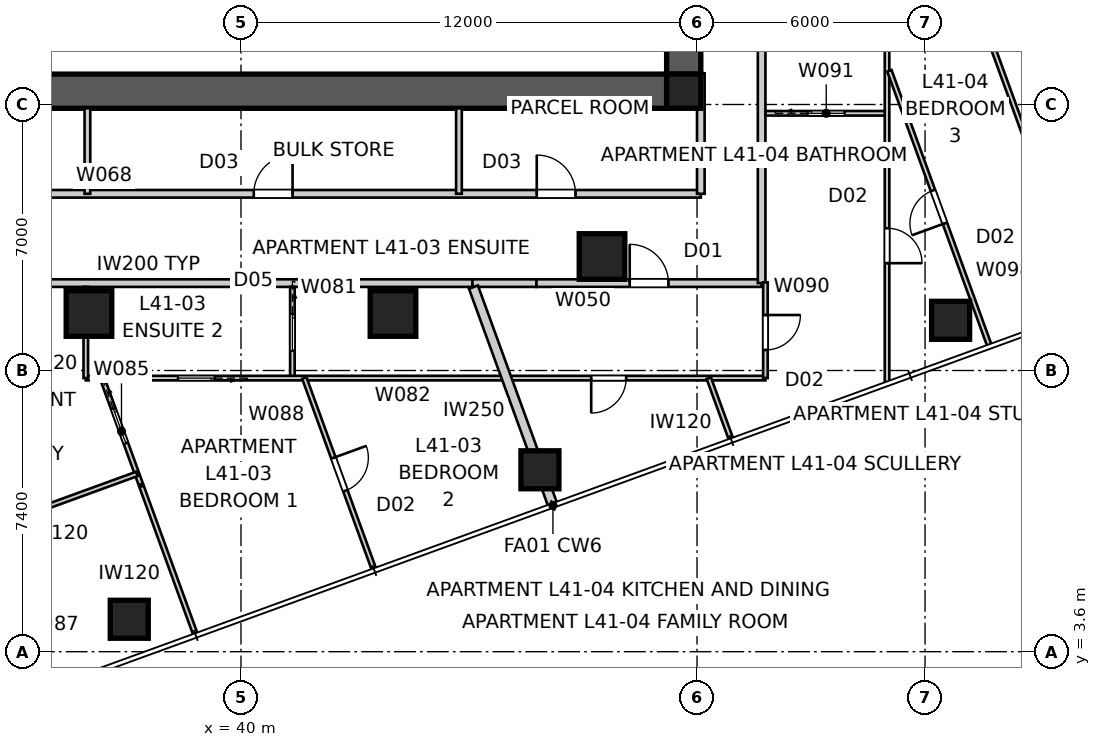
"""IFC4 building model, lengths in metres.
Left out: names, types, materials, properties, quantities, classifications, styles, units other than length and angle.
Written with IfcOpenShell. Run it as: python <this file> out.ifc"""

import sys

from ifc_helpers import new_model, si_unit, direction, frame, frame_2d, origin, origin_2d, place, context, subcontext, project, spatial, polyline, rectangle, outline, extrude, element, fill, save


model = new_model("IFC4")
c1 = context("Model", 3, precision=1e-05, world=origin(), true_north=direction((0.0, 1.0)))
c2 = subcontext(c1, "Body", "Model", "MODEL_VIEW")
j1 = project(units=[si_unit("LENGTHUNIT", "METRE"), si_unit("PLANEANGLEUNIT", "RADIAN")], contexts=[c1])
p1 = place(None, origin())
s1 = spatial("IfcSite", under=j1, at=p1, CompositionType="ELEMENT")
p2 = place(p1, origin())
s2 = spatial("IfcBuilding", under=s1, at=p2, CompositionType="ELEMENT")
p3 = place(p2, frame((0.0, 0.0, 150.6)))
s3 = spatial("IfcBuildingStorey", under=s2, at=p3, CompositionType="ELEMENT", Elevation=150.6)
p4 = place(p3, frame((51.2, 18.35, 0.0), z_axis=(0.0, 0.0, 1.0), x_axis=(-1.0, 0.0, 0.0)))
e1 = element("IfcWall", 1, at=p4, inside=s3, PredefinedType="SHEAR", context=c2, shape_type="SweptSolid", body=[
    extrude(outline(polyline([(0.0, -0.45), (22.4, -0.45), (22.4, -0.025), (22.85, -0.025), (22.85, 0.025), (22.4, 0.025), (22.4, 0.45), (0.0, 0.45), (0.0, 0.025), (-0.45, 0.025), (-0.45, -0.025), (0.0, -0.025), (0.0, -0.45)])), origin(), (0.0, 0.0, 1.0), 3.4),
])
p5 = place(p3, frame((51.65, 18.8, 0.0), z_axis=(0.0, 0.0, 1.0), x_axis=(0.0, 1.0, 0.0)))
e2 = element("IfcWall", 2, at=p5, inside=s3, PredefinedType="SHEAR", context=c2, shape_type="SweptSolid", body=[
    extrude(outline(polyline([(0.0, -0.45), (22.4, -0.45), (22.4, -0.025), (22.85, -0.025), (22.85, 0.025), (22.4, 0.025), (22.4, 0.45), (0.0, 0.45), (0.0, 0.025), (-0.45, 0.025), (-0.45, -0.025), (0.0, -0.025), (0.0, -0.45)])), origin(), (0.0, 0.0, 1.0), 3.4),
])
p6 = place(p5, frame((11.14, 0.0, 0.0)))
e3 = element("IfcOpeningElement", 3, at=p6, cuts=e2, PredefinedType="OPENING", context=c2, shape_type="SweptSolid", body=[
    extrude(rectangle(XDim=1.02, YDim=2.4, at=frame_2d((0.51, 1.2))), frame((0.0, 0.46, 0.0), z_axis=(0.0, -1.0, 0.0), x_axis=(1.0, 0.0, 0.0)), (0.0, 0.0, 1.0), 0.92),
])
p7 = place(p3, frame((51.65, 18.35, 0.0), z_axis=(0.0, 0.0, 1.0), x_axis=(1.0, 0.0, 0.0)))
e4 = element("IfcColumn", 4, at=p7, inside=s3, PredefinedType="COLUMN", context=c2, shape_type="SweptSolid", body=[
    extrude(rectangle(XDim=0.9, YDim=0.9, at=origin_2d()), origin(), (0.0, 0.0, 1.0), 3.4),
])
for number, where, z_axis, x_axis in (
    (5, (37.06, 4.454, 0.0), (0.0, 0.0, 1.0), (1.0, 0.0, 0.0)),
    (6, (47.866, 8.387, 0.0), (0.0, 0.0, 1.0), (1.0, 0.0, 0.0)),
    (7, (58.673, 12.32, 0.0), (0.0, 0.0, 1.0), (1.0, 0.0, 0.0)),
):
    element("IfcColumn", number, at=place(p3, frame(where, z_axis=z_axis, x_axis=x_axis)), inside=s3, PredefinedType="COLUMN", context=c2, shape_type="SweptSolid", body=[
        extrude(rectangle(XDim=1.0, YDim=1.0, at=origin_2d()), origin(), (0.0, 0.0, 1.0), 3.4),
    ])
for number, where, z_axis, x_axis in (
    (8, (36.0, 12.5, 0.0), (0.0, 0.0, 1.0), (1.0, 0.0, 0.0)),
    (9, (44.0, 12.5, 0.0), (0.0, 0.0, 1.0), (1.0, 0.0, 0.0)),
    (10, (49.5, 14.0, 0.0), (0.0, 0.0, 1.0), (1.0, 0.0, 0.0)),
):
    element("IfcColumn", number, at=place(p3, frame(where, z_axis=z_axis, x_axis=x_axis)), inside=s3, PredefinedType="COLUMN", context=c2, shape_type="SweptSolid", body=[
        extrude(rectangle(XDim=1.2, YDim=1.2, at=origin_2d()), origin(), (0.0, 0.0, 1.0), 3.4),
    ])
p8 = place(p3, frame((33.908, 13.3, 0.0), z_axis=(0.0, 0.0, 1.0), x_axis=(1.0, 0.0, 0.0)))
e11 = element("IfcWall", 11, at=p8, inside=s3, PredefinedType="PARTITIONING", context=c2, shape_type="SweptSolid", body=[
    extrude(rectangle(XDim=12.183, YDim=0.2, at=frame_2d((6.092, 0.0))), origin(), (0.0, 0.0, 1.0), 3.25),
])
p9 = place(p3, frame((46.092, 13.3, 0.0), z_axis=(0.0, 0.0, 1.0), x_axis=(1.0, 0.0, 0.0)))
e12 = element("IfcWall", 12, at=p9, inside=s3, PredefinedType="PARTITIONING", context=c2, shape_type="SweptSolid", body=[
    extrude(rectangle(XDim=1.684, YDim=0.2, at=frame_2d((0.842, 0.0))), origin(), (0.0, 0.0, 1.0), 2.55),
])
p10 = place(p3, frame((47.775, 13.3, 0.0), z_axis=(0.0, 0.0, 1.0), x_axis=(1.0, 0.0, 0.0)))
e13 = element("IfcWall", 13, at=p10, inside=s3, PredefinedType="PARTITIONING", context=c2, shape_type="SweptSolid", body=[
    extrude(rectangle(XDim=5.925, YDim=0.2, at=frame_2d((2.962, 0.0))), origin(), (0.0, 0.0, 1.0), 3.25),
])
p11 = place(p10, frame((2.453, 0.0, 0.0)))
e14 = element("IfcOpeningElement", 14, at=p11, cuts=e13, PredefinedType="OPENING", context=c2, shape_type="SweptSolid", body=[
    extrude(rectangle(XDim=1.02, YDim=2.34, at=frame_2d((0.51, 1.17))), frame((0.0, 0.11, 0.0), z_axis=(0.0, -1.0, 0.0), x_axis=(1.0, 0.0, 0.0)), (0.0, 0.0, 1.0), 0.22),
])
p12 = place(p3, frame((53.7, 13.3, 0.0), z_axis=(0.0, 0.0, 1.0), x_axis=(0.0, 1.0, 0.0)))
e15 = element("IfcWall", 15, at=p12, inside=s3, PredefinedType="PARTITIONING", context=c2, shape_type="SweptSolid", body=[
    extrude(rectangle(XDim=33.0, YDim=0.2, at=frame_2d((16.5, 0.0))), origin(), (0.0, 0.0, 1.0), 3.25),
])
p13 = place(p12, frame((28.411, 0.0, 0.0)))
e16 = element("IfcOpeningElement", 16, at=p13, cuts=e15, PredefinedType="OPENING", context=c2, shape_type="SweptSolid", body=[
    extrude(rectangle(XDim=1.02, YDim=2.1, at=frame_2d((0.51, 1.05))), frame((0.0, 0.11, 0.0), z_axis=(0.0, -1.0, 0.0), x_axis=(1.0, 0.0, 0.0)), (0.0, 0.0, 1.0), 0.22),
])
p14 = place(p12, frame((13.741, 0.0, 0.0)))
e17 = element("IfcOpeningElement", 17, at=p14, cuts=e15, PredefinedType="OPENING", context=c2, shape_type="SweptSolid", body=[
    extrude(rectangle(XDim=1.02, YDim=2.34, at=frame_2d((0.51, 1.17))), frame((0.0, 0.11, 0.0), z_axis=(0.0, -1.0, 0.0), x_axis=(1.0, 0.0, 0.0)), (0.0, 0.0, 1.0), 0.22),
])
p15 = place(p3, frame((48.208, 7.447, 0.0), z_axis=(0.0, 0.0, 1.0), x_axis=(-0.341999444481, 0.939700154291, 0.0)))
e18 = element("IfcWall", 18, at=p15, inside=s3, PredefinedType="PARTITIONING", context=c2, shape_type="SweptSolid", body=[
    extrude(rectangle(XDim=6.116, YDim=0.25, at=frame_2d((3.058, 0.0))), origin(), (0.0, 0.0, 1.0), 3.25),
])
p16 = place(p3, frame((27.9, 15.65, 0.0), z_axis=(0.0, 0.0, 1.0), x_axis=(1.0, 0.0, 0.0)))
e19 = element("IfcWall", 19, at=p16, inside=s3, PredefinedType="PARTITIONING", context=c2, shape_type="SweptSolid", body=[
    extrude(rectangle(XDim=24.2, YDim=0.2, at=frame_2d((12.1, 0.0))), origin(), (0.0, 0.0, 1.0), 3.25),
])
p17 = place(p16, frame((12.437, 0.0, 0.0)))
e20 = element("IfcOpeningElement", 20, at=p17, cuts=e19, PredefinedType="OPENING", context=c2, shape_type="SweptSolid", body=[
    extrude(rectangle(XDim=1.02, YDim=2.1, at=frame_2d((0.51, 1.05))), frame((0.0, 0.11, 0.0), z_axis=(0.0, -1.0, 0.0), x_axis=(1.0, 0.0, 0.0)), (0.0, 0.0, 1.0), 0.22),
])
p18 = place(p16, frame((3.544, 0.0, 0.0)))
e21 = element("IfcOpeningElement", 21, at=p18, cuts=e19, PredefinedType="OPENING", context=c2, shape_type="SweptSolid", body=[
    extrude(rectangle(XDim=1.02, YDim=2.1, at=frame_2d((0.51, 1.05))), frame((0.0, 0.11, 0.0), z_axis=(0.0, -1.0, 0.0), x_axis=(1.0, 0.0, 0.0)), (0.0, 0.0, 1.0), 0.22),
])
p19 = place(p16, frame((19.883, 0.0, 0.0)))
e22 = element("IfcOpeningElement", 22, at=p19, cuts=e19, PredefinedType="OPENING", context=c2, shape_type="SweptSolid", body=[
    extrude(rectangle(XDim=1.02, YDim=2.1, at=frame_2d((0.51, 1.05))), frame((0.0, 0.11, 0.0), z_axis=(0.0, -1.0, 0.0), x_axis=(1.0, 0.0, 0.0)), (0.0, 0.0, 1.0), 0.22),
])
p20 = place(p3, frame((52.1, 15.65, 0.0), z_axis=(0.0, 0.0, 1.0), x_axis=(0.0, 1.0, 0.0)))
e23 = element("IfcWall", 23, at=p20, inside=s3, PredefinedType="PARTITIONING", context=c2, shape_type="SweptSolid", body=[
    extrude(rectangle(XDim=3.17, YDim=0.2, at=frame_2d((1.585, 0.0))), origin(), (0.0, 0.0, 1.0), 3.25),
])
p21 = place(p3, frame((35.958, 15.65, 0.0), z_axis=(0.0, 0.0, 1.0), x_axis=(0.0, 1.0, 0.0)))
e24 = element("IfcWall", 24, at=p21, inside=s3, PredefinedType="SOLIDWALL", context=c2, shape_type="SweptSolid", body=[
    extrude(rectangle(XDim=2.25, YDim=0.15, at=frame_2d((1.125, 0.0))), origin(), (0.0, 0.0, 1.0), 3.25),
])
p22 = place(p3, frame((45.735, 15.65, 0.0), z_axis=(0.0, 0.0, 1.0), x_axis=(0.0, 1.0, 0.0)))
e25 = element("IfcWall", 25, at=p22, inside=s3, PredefinedType="SOLIDWALL", context=c2, shape_type="SweptSolid", body=[
    extrude(rectangle(XDim=2.25, YDim=0.15, at=frame_2d((1.125, 0.0))), origin(), (0.0, 0.0, 1.0), 2.796),
])
p23 = place(p3, frame((41.353, 13.2, 0.0), z_axis=(0.0, 0.0, 1.0), x_axis=(0.0, -1.0, 0.0)))
e26 = element("IfcWall", 26, at=p23, inside=s3, PredefinedType="PARTITIONING", context=c2, shape_type="SweptSolid", body=[
    extrude(rectangle(XDim=2.4, YDim=0.12, at=frame_2d((1.2, 0.0))), origin(), (0.0, 0.0, 1.0), 3.25),
])
p24 = place(p23, frame((0.72, 0.0, 0.0)))
e27 = element("IfcOpeningElement", 27, at=p24, cuts=e26, PredefinedType="OPENING", context=c2, shape_type="SweptSolid", body=[
    extrude(rectangle(XDim=0.96, YDim=2.1, at=frame_2d((0.48, 1.05))), frame((0.0, 0.07, 0.0), z_axis=(0.0, -1.0, 0.0), x_axis=(1.0, 0.0, 0.0)), (0.0, 0.0, 1.0), 0.14),
])
p25 = place(p3, frame((53.8, 10.8, 0.0), z_axis=(0.0, 0.0, 1.0), x_axis=(-1.0, 0.0, 0.0)))
e28 = element("IfcWall", 28, at=p25, inside=s3, PredefinedType="PARTITIONING", context=c2, shape_type="SweptSolid", body=[
    extrude(rectangle(XDim=17.884, YDim=0.12, at=frame_2d((8.942, 0.0))), origin(), (0.0, 0.0, 1.0), 3.25),
])
p26 = place(p25, frame((3.665, 0.0, 0.0)))
e29 = element("IfcOpeningElement", 29, at=p26, cuts=e28, PredefinedType="OPENING", context=c2, shape_type="SweptSolid", body=[
    extrude(rectangle(XDim=0.92, YDim=2.34, at=frame_2d((0.46, 1.17))), frame((0.0, 0.07, 0.0), z_axis=(0.0, -1.0, 0.0), x_axis=(1.0, 0.0, 0.0)), (0.0, 0.0, 1.0), 0.14),
])
p27 = place(p25, frame((14.497, 0.0, 0.0)))
e30 = element("IfcOpeningElement", 30, at=p27, cuts=e28, PredefinedType="OPENING", context=c2, shape_type="SweptSolid", body=[
    extrude(rectangle(XDim=0.96, YDim=2.1, at=frame_2d((0.48, 1.05))), frame((0.0, 0.07, 0.0), z_axis=(0.0, -1.0, 0.0), x_axis=(1.0, 0.0, 0.0)), (0.0, 0.0, 1.0), 0.14),
])
p28 = place(p3, frame((35.916, 10.8, 0.0), z_axis=(0.0, 0.0, 1.0), x_axis=(0.0, 1.0, 0.0)))
e31 = element("IfcWall", 31, at=p28, inside=s3, PredefinedType="PARTITIONING", context=c2, shape_type="SweptSolid", body=[
    extrude(rectangle(XDim=2.4, YDim=0.12, at=frame_2d((1.2, 0.0))), origin(), (0.0, 0.0, 1.0), 3.25),
])
p29 = place(p3, frame((36.346, 10.8, 0.0), z_axis=(0.0, 0.0, 1.0), x_axis=(0.341986632257, -0.939704817141, 0.0)))
e32 = element("IfcWall", 32, at=p29, inside=s3, PredefinedType="PARTITIONING", context=c2, shape_type="SweptSolid", body=[
    extrude(rectangle(XDim=2.978, YDim=0.12, at=frame_2d((1.489, 0.0))), origin(), (0.0, 0.0, 1.0), 3.25),
])
p30 = place(p29, frame((0.861, 0.0, 0.0)))
e33 = element("IfcOpeningElement", 33, at=p30, cuts=e32, PredefinedType="OPENING", context=c2, shape_type="SweptSolid", body=[
    extrude(rectangle(XDim=0.96, YDim=2.1, at=frame_2d((0.48, 1.05))), frame((0.0, 0.07, 0.0), z_axis=(0.0, -1.0, 0.0), x_axis=(1.0, 0.0, 0.0)), (0.0, 0.0, 1.0), 0.14),
])
p31 = place(p3, frame((37.264, 8.28, 0.0), z_axis=(0.0, 0.0, 1.0), x_axis=(-0.939686455819, -0.342037080957, 0.0)))
e34 = element("IfcWall", 34, at=p31, inside=s3, PredefinedType="PARTITIONING", context=c2, shape_type="SweptSolid", body=[
    extrude(rectangle(XDim=5.0, YDim=0.12, at=frame_2d((2.5, 0.0))), origin(), (0.0, 0.0, 1.0), 3.25),
])
p32 = place(p3, frame((41.667, 10.8, 0.0), z_axis=(0.0, 0.0, 1.0), x_axis=(0.341995981916, -0.939701414468, 0.0)))
e35 = element("IfcWall", 35, at=p32, inside=s3, PredefinedType="PARTITIONING", context=c2, shape_type="SweptSolid", body=[
    extrude(rectangle(XDim=5.348, YDim=0.12, at=frame_2d((2.674, 0.0))), origin(), (0.0, 0.0, 1.0), 3.25),
])
p33 = place(p32, frame((2.234, 0.0, 0.0)))
e36 = element("IfcOpeningElement", 36, at=p33, cuts=e35, PredefinedType="OPENING", context=c2, shape_type="SweptSolid", body=[
    extrude(rectangle(XDim=0.92, YDim=2.34, at=frame_2d((0.46, 1.17))), frame((0.0, 0.07, 0.0), z_axis=(0.0, -1.0, 0.0), x_axis=(1.0, 0.0, 0.0)), (0.0, 0.0, 1.0), 0.14),
])
p34 = place(p3, frame((38.798, 4.065, 0.0), z_axis=(0.0, 0.0, 1.0), x_axis=(-0.342036918442, 0.939686514973, 0.0)))
e37 = element("IfcWall", 37, at=p34, inside=s3, PredefinedType="PARTITIONING", context=c2, shape_type="SweptSolid", body=[
    extrude(rectangle(XDim=4.136, YDim=0.12, at=frame_2d((2.068, 0.0))), origin(), (0.0, 0.0, 1.0), 3.25),
])
p35 = place(p3, frame((53.8, 13.32, 0.0), z_axis=(0.0, 0.0, 1.0), x_axis=(0.0, -1.0, 0.0)))
e38 = element("IfcWall", 38, at=p35, inside=s3, PredefinedType="PARTITIONING", context=c2, shape_type="SweptSolid", body=[
    extrude(rectangle(XDim=2.52, YDim=0.12, at=frame_2d((1.26, 0.0))), origin(), (0.0, 0.0, 1.0), 3.25),
])
p36 = place(p35, frame((0.86, 0.0, 0.0)))
e39 = element("IfcOpeningElement", 39, at=p36, cuts=e38, PredefinedType="OPENING", context=c2, shape_type="SweptSolid", body=[
    extrude(rectangle(XDim=0.92, YDim=2.34, at=frame_2d((0.46, 1.17))), frame((0.0, 0.07, 0.0), z_axis=(0.0, -1.0, 0.0), x_axis=(1.0, 0.0, 0.0)), (0.0, 0.0, 1.0), 0.14),
])
p37 = place(p3, frame((53.8, 17.769, 0.0), z_axis=(0.0, 0.0, 1.0), x_axis=(1.0, 0.0, 0.0)))
e40 = element("IfcWall", 40, at=p37, inside=s3, PredefinedType="PARTITIONING", context=c2, shape_type="SweptSolid", body=[
    extrude(rectangle(XDim=3.2, YDim=0.12, at=frame_2d((1.6, 0.0))), origin(), (0.0, 0.0, 1.0), 3.25),
])
p38 = place(p37, frame((1.12, 0.0, 0.0)))
e41 = element("IfcOpeningElement", 41, at=p38, cuts=e40, PredefinedType="OPENING", context=c2, shape_type="SweptSolid", body=[
    extrude(rectangle(XDim=0.96, YDim=2.1, at=frame_2d((0.48, 1.05))), frame((0.0, 0.07, 0.0), z_axis=(0.0, -1.0, 0.0), x_axis=(1.0, 0.0, 0.0)), (0.0, 0.0, 1.0), 0.14),
])
p39 = place(p3, frame((57.0, 48.8, 0.0), z_axis=(0.0, 0.0, 1.0), x_axis=(0.0, -1.0, 0.0)))
e42 = element("IfcWall", 42, at=p39, inside=s3, PredefinedType="PARTITIONING", context=c2, shape_type="SweptSolid", body=[
    extrude(rectangle(XDim=38.113, YDim=0.12, at=frame_2d((19.056, 0.0))), origin(), (0.0, 0.0, 1.0), 2.55),
])
p40 = place(p39, frame((4.198, 0.0, 0.0)))
e43 = element("IfcOpeningElement", 43, at=p40, cuts=e42, PredefinedType="OPENING", context=c2, shape_type="SweptSolid", body=[
    extrude(rectangle(XDim=0.92, YDim=2.34, at=frame_2d((0.46, 1.17))), frame((0.0, 0.07, 0.0), z_axis=(0.0, -1.0, 0.0), x_axis=(1.0, 0.0, 0.0)), (0.0, 0.0, 1.0), 0.14),
])
p41 = place(p39, frame((7.692, 0.0, 0.0)))
e44 = element("IfcOpeningElement", 44, at=p41, cuts=e42, PredefinedType="OPENING", context=c2, shape_type="SweptSolid", body=[
    extrude(rectangle(XDim=0.92, YDim=2.34, at=frame_2d((0.46, 1.17))), frame((0.0, 0.07, 0.0), z_axis=(0.0, -1.0, 0.0), x_axis=(1.0, 0.0, 0.0)), (0.0, 0.0, 1.0), 0.14),
])
p42 = place(p39, frame((20.162, 0.0, 0.0)))
e45 = element("IfcOpeningElement", 45, at=p42, cuts=e42, PredefinedType="OPENING", context=c2, shape_type="SweptSolid", body=[
    extrude(rectangle(XDim=0.92, YDim=2.34, at=frame_2d((0.46, 1.17))), frame((0.0, 0.07, 0.0), z_axis=(0.0, -1.0, 0.0), x_axis=(1.0, 0.0, 0.0)), (0.0, 0.0, 1.0), 0.14),
])
p43 = place(p39, frame((34.056, 0.0, 0.0)))
e46 = element("IfcOpeningElement", 46, at=p43, cuts=e42, PredefinedType="OPENING", context=c2, shape_type="SweptSolid", body=[
    extrude(rectangle(XDim=0.92, YDim=2.34, at=frame_2d((0.46, 1.17))), frame((0.0, 0.07, 0.0), z_axis=(0.0, -1.0, 0.0), x_axis=(1.0, 0.0, 0.0)), (0.0, 0.0, 1.0), 0.14),
])
p44 = place(p39, frame((24.482, 0.0, 0.0)))
e47 = element("IfcOpeningElement", 47, at=p44, cuts=e42, PredefinedType="OPENING", context=c2, shape_type="SweptSolid", body=[
    extrude(rectangle(XDim=0.96, YDim=2.1, at=frame_2d((0.48, 1.05))), frame((0.0, 0.07, 0.0), z_axis=(0.0, -1.0, 0.0), x_axis=(1.0, 0.0, 0.0)), (0.0, 0.0, 1.0), 0.14),
])
p45 = place(p3, frame((52.893, 9.195, 0.0), z_axis=(0.0, 0.0, 1.0), x_axis=(-0.342052919471, 0.939680690597, 0.0)))
e48 = element("IfcWall", 48, at=p45, inside=s3, PredefinedType="PARTITIONING", context=c2, shape_type="SweptSolid", body=[
    extrude(rectangle(XDim=1.708, YDim=0.12, at=frame_2d((0.854, 0.0))), origin(), (0.0, 0.0, 1.0), 3.25),
])
p46 = place(p3, frame((62.29, 12.615, 0.0), z_axis=(0.0, 0.0, 1.0), x_axis=(-0.342038393654, 0.939685978009, 0.0)))
e49 = element("IfcWall", 49, at=p46, inside=s3, PredefinedType="PARTITIONING", context=c2, shape_type="SweptSolid", body=[
    extrude(rectangle(XDim=8.96, YDim=0.12, at=frame_2d((4.48, 0.0))), origin(), (0.0, 0.0, 1.0), 3.25),
])
p47 = place(p3, frame((59.689, 11.669, 0.0), z_axis=(0.0, 0.0, 1.0), x_axis=(-0.342003311293, 0.939698746974, 0.0)))
e50 = element("IfcWall", 50, at=p47, inside=s3, PredefinedType="PARTITIONING", context=c2, shape_type="SweptSolid", body=[
    extrude(rectangle(XDim=7.683, YDim=0.12, at=frame_2d((3.841, 0.0))), origin(), (0.0, 0.0, 1.0), 3.25),
])
p48 = place(p47, frame((3.411, 0.0, 0.0)))
e51 = element("IfcOpeningElement", 51, at=p48, cuts=e50, PredefinedType="OPENING", context=c2, shape_type="SweptSolid", body=[
    extrude(rectangle(XDim=0.92, YDim=2.34, at=frame_2d((0.46, 1.17))), frame((0.0, 0.07, 0.0), z_axis=(0.0, -1.0, 0.0), x_axis=(1.0, 0.0, 0.0)), (0.0, 0.0, 1.0), 0.14),
])
p49 = place(p17, origin())
e52 = element("IfcDoor", 52, at=p49, inside=s3, OperationType="SINGLE_SWING_RIGHT", PredefinedType="DOOR", context=c2, shape_type="SweptSolid", body=[
    extrude(rectangle(XDim=1.02, YDim=2.1, at=frame_2d((0.51, 1.05))), frame((0.0, 0.025, 0.0), z_axis=(0.0, -1.0, 0.0), x_axis=(1.0, 0.0, 0.0)), (0.0, 0.0, 1.0), 0.05),
])
fill(e20, e52)
p50 = place(p11, origin())
e53 = element("IfcDoor", 53, at=p50, inside=s3, OperationType="SINGLE_SWING_LEFT", PredefinedType="DOOR", context=c2, shape_type="SweptSolid", body=[
    extrude(rectangle(XDim=1.02, YDim=2.34, at=frame_2d((0.51, 1.17))), frame((0.0, 0.025, 0.0), z_axis=(0.0, -1.0, 0.0), x_axis=(1.0, 0.0, 0.0)), (0.0, 0.0, 1.0), 0.05),
])
fill(e14, e53)
p51 = place(p19, origin())
e54 = element("IfcDoor", 54, at=p51, inside=s3, OperationType="SINGLE_SWING_LEFT", PredefinedType="DOOR", context=c2, shape_type="SweptSolid", body=[
    extrude(rectangle(XDim=1.02, YDim=2.1, at=frame_2d((0.51, 1.05))), frame((0.0, 0.025, 0.0), z_axis=(0.0, -1.0, 0.0), x_axis=(1.0, 0.0, 0.0)), (0.0, 0.0, 1.0), 0.05),
])
fill(e22, e54)
p52 = place(p26, origin())
e55 = element("IfcDoor", 55, at=p52, inside=s3, OperationType="SINGLE_SWING_RIGHT", PredefinedType="DOOR", context=c2, shape_type="SweptSolid", body=[
    extrude(rectangle(XDim=0.92, YDim=2.34, at=frame_2d((0.46, 1.17))), frame((0.0, 0.025, 0.0), z_axis=(0.0, -1.0, 0.0), x_axis=(1.0, 0.0, 0.0)), (0.0, 0.0, 1.0), 0.05),
])
fill(e29, e55)
p53 = place(p36, origin())
e56 = element("IfcDoor", 56, at=p53, inside=s3, OperationType="SINGLE_SWING_LEFT", PredefinedType="DOOR", context=c2, shape_type="SweptSolid", body=[
    extrude(rectangle(XDim=0.92, YDim=2.34, at=frame_2d((0.46, 1.17))), frame((0.0, 0.025, 0.0), z_axis=(0.0, -1.0, 0.0), x_axis=(1.0, 0.0, 0.0)), (0.0, 0.0, 1.0), 0.05),
])
fill(e39, e56)
p54 = place(p43, origin())
e57 = element("IfcDoor", 57, at=p54, inside=s3, OperationType="SINGLE_SWING_RIGHT", PredefinedType="DOOR", context=c2, shape_type="SweptSolid", body=[
    extrude(rectangle(XDim=0.92, YDim=2.34, at=frame_2d((0.46, 1.17))), frame((0.0, 0.025, 0.0), z_axis=(0.0, -1.0, 0.0), x_axis=(1.0, 0.0, 0.0)), (0.0, 0.0, 1.0), 0.05),
])
fill(e46, e57)
p55 = place(p38, origin())
e58 = element("IfcDoor", 58, at=p55, inside=s3, OperationType="SLIDING_TO_LEFT", PredefinedType="DOOR", context=c2, shape_type="SweptSolid", body=[
    extrude(rectangle(XDim=0.96, YDim=2.1, at=frame_2d((0.48, 1.05))), frame((0.0, 0.025, 0.0), z_axis=(0.0, -1.0, 0.0), x_axis=(1.0, 0.0, 0.0)), (0.0, 0.0, 1.0), 0.05),
])
fill(e41, e58)
p56 = place(p30, origin())
e59 = element("IfcDoor", 59, at=p56, inside=s3, OperationType="SLIDING_TO_LEFT", PredefinedType="DOOR", context=c2, shape_type="SweptSolid", body=[
    extrude(rectangle(XDim=0.96, YDim=2.1, at=frame_2d((0.48, 1.05))), frame((0.0, 0.025, 0.0), z_axis=(0.0, -1.0, 0.0), x_axis=(1.0, 0.0, 0.0)), (0.0, 0.0, 1.0), 0.05),
])
fill(e33, e59)
p57 = place(p48, origin())
e60 = element("IfcDoor", 60, at=p57, inside=s3, OperationType="SINGLE_SWING_LEFT", PredefinedType="DOOR", context=c2, shape_type="SweptSolid", body=[
    extrude(rectangle(XDim=0.92, YDim=2.34, at=frame_2d((0.46, 1.17))), frame((0.0, 0.025, 0.0), z_axis=(0.0, -1.0, 0.0), x_axis=(1.0, 0.0, 0.0)), (0.0, 0.0, 1.0), 0.05),
])
fill(e51, e60)
p58 = place(p33, origin())
e61 = element("IfcDoor", 61, at=p58, inside=s3, OperationType="SINGLE_SWING_LEFT", PredefinedType="DOOR", context=c2, shape_type="SweptSolid", body=[
    extrude(rectangle(XDim=0.92, YDim=2.34, at=frame_2d((0.46, 1.17))), frame((0.0, 0.025, 0.0), z_axis=(0.0, -1.0, 0.0), x_axis=(1.0, 0.0, 0.0)), (0.0, 0.0, 1.0), 0.05),
])
fill(e36, e61)
p59 = place(p27, origin())
e62 = element("IfcDoor", 62, at=p59, inside=s3, OperationType="SLIDING_TO_LEFT", PredefinedType="DOOR", context=c2, shape_type="SweptSolid", body=[
    extrude(rectangle(XDim=0.96, YDim=2.1, at=frame_2d((0.48, 1.05))), frame((0.0, 0.025, 0.0), z_axis=(0.0, -1.0, 0.0), x_axis=(1.0, 0.0, 0.0)), (0.0, 0.0, 1.0), 0.05),
])
fill(e30, e62)
p60 = place(p24, origin())
e63 = element("IfcDoor", 63, at=p60, inside=s3, OperationType="SLIDING_TO_LEFT", PredefinedType="DOOR", context=c2, shape_type="SweptSolid", body=[
    extrude(rectangle(XDim=0.96, YDim=2.1, at=frame_2d((0.48, 1.05))), frame((0.0, 0.025, 0.0), z_axis=(0.0, -1.0, 0.0), x_axis=(1.0, 0.0, 0.0)), (0.0, 0.0, 1.0), 0.05),
])
fill(e27, e63)
save(model, sys.argv[1])
